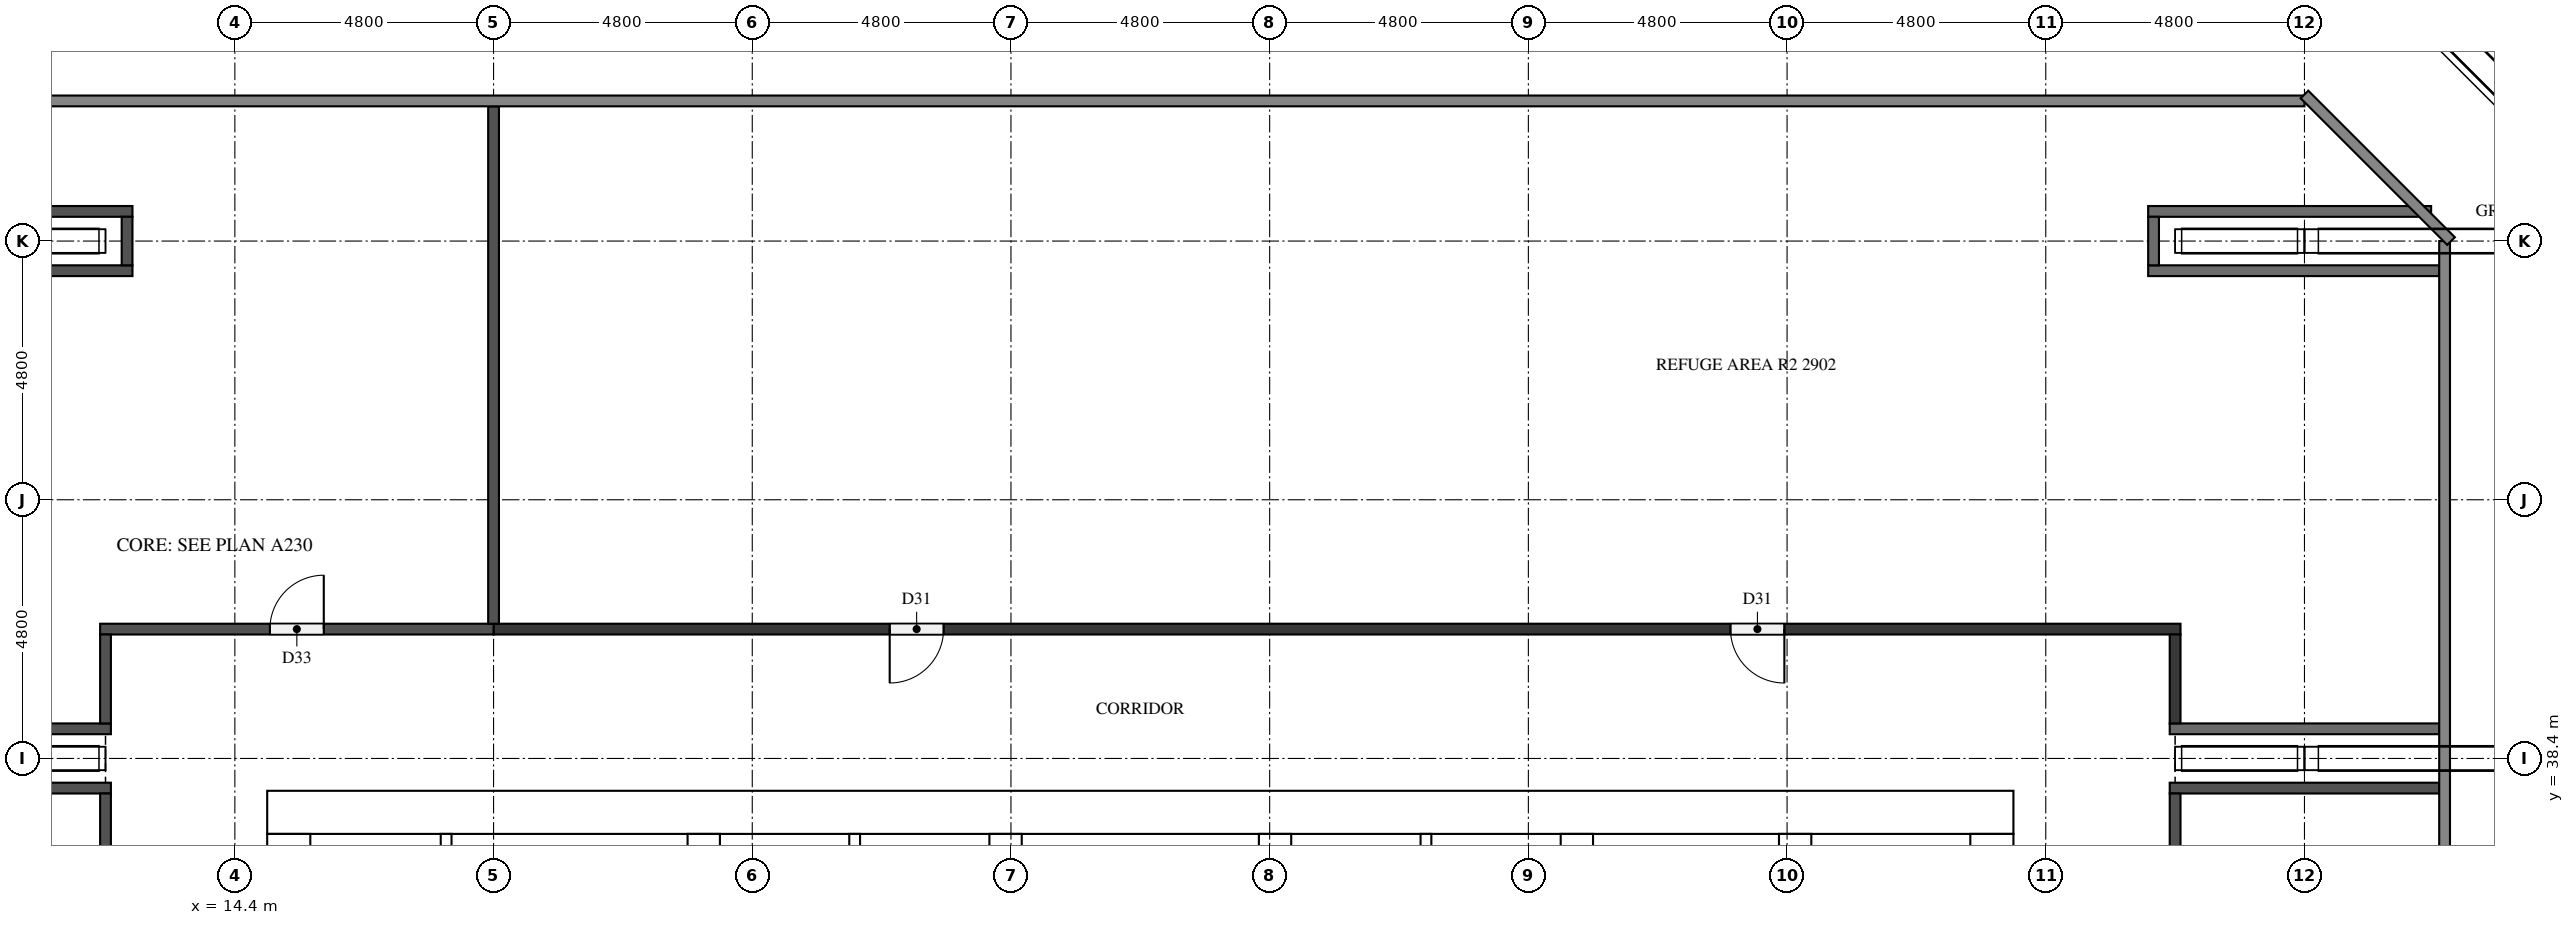
"""IFC4 building model, lengths in metres.
Left out: names, types, materials, properties, quantities, classifications, styles, units other than length and angle.
Written with IfcOpenShell. Run it as: python <this file> out.ifc"""

import sys

from ifc_helpers import new_model, si_unit, direction, frame, frame_2d, origin, place, context, subcontext, project, spatial, rectangle, extrude, element, fill, save


model = new_model("IFC4")
c1 = context("Model", 3, precision=1e-05, world=origin(), true_north=direction((0.0, 1.0)))
c2 = subcontext(c1, "Body", "Model", "MODEL_VIEW")
j1 = project(units=[si_unit("LENGTHUNIT", "METRE"), si_unit("PLANEANGLEUNIT", "RADIAN")], contexts=[c1])
p1 = place(None, origin())
s1 = spatial("IfcSite", under=j1, at=p1, CompositionType="ELEMENT")
p2 = place(p1, origin())
s2 = spatial("IfcBuilding", under=s1, at=p2, CompositionType="ELEMENT")
p3 = place(p2, frame((0.0, 0.0, 113.7)))
s3 = spatial("IfcBuildingStorey", under=s2, at=p3, CompositionType="ELEMENT", Elevation=113.7)
p4 = place(p3, frame((15.0, 37.4, 0.0), z_axis=(0.0, 0.0, 1.0), x_axis=(1.0, 0.0, 0.0)))
e1 = element("IfcWall", 1, at=p4, inside=s3, PredefinedType="SHEAR", context=c2, shape_type="SweptSolid", body=[
    extrude(rectangle(XDim=32.4, YDim=0.8, at=frame_2d((16.2, 0.0))), origin(), (0.0, 0.0, 1.0), 5.1),
])
p5 = place(p4, frame((15.3, 0.0, 0.0)))
e2 = element("IfcOpeningElement", 2, at=p5, cuts=e1, PredefinedType="OPENING", context=c2, shape_type="SweptSolid", body=[
    extrude(rectangle(XDim=1.8, YDim=2.1, at=frame_2d((0.9, 1.05))), frame((0.0, 0.41, 0.0), z_axis=(0.0, -1.0, 0.0), x_axis=(1.0, 0.0, 0.0)), (0.0, 0.0, 1.0), 0.82),
])
p6 = place(p4, frame((1.51, 0.0, 0.0)))
e3 = element("IfcOpeningElement", 3, at=p6, cuts=e1, PredefinedType="OPENING", context=c2, shape_type="SweptSolid", body=[
    extrude(rectangle(XDim=1.0, YDim=2.1, at=frame_2d((0.5, 1.05))), frame((0.0, 0.41, 0.0), z_axis=(0.0, -1.0, 0.0), x_axis=(1.0, 0.0, 0.0)), (0.0, 0.0, 1.0), 0.82),
])
p7 = place(p4, frame((5.11, 0.0, 0.0)))
e4 = element("IfcOpeningElement", 4, at=p7, cuts=e1, PredefinedType="OPENING", context=c2, shape_type="SweptSolid", body=[
    extrude(rectangle(XDim=1.0, YDim=2.1, at=frame_2d((0.5, 1.05))), frame((0.0, 0.41, 0.0), z_axis=(0.0, -1.0, 0.0), x_axis=(1.0, 0.0, 0.0)), (0.0, 0.0, 1.0), 0.82),
])
p8 = place(p3, frame((15.4, 15.8, 0.0), z_axis=(0.0, 0.0, 1.0), x_axis=(0.0, 1.0, 0.0)))
e5 = element("IfcWall", 5, at=p8, inside=s3, PredefinedType="SHEAR", context=c2, shape_type="SweptSolid", body=[
    extrude(rectangle(XDim=21.2, YDim=0.8, at=frame_2d((10.6, 0.0))), origin(), (0.0, 0.0, 1.0), 5.1),
])
p9 = place(p8, frame((4.96, 0.0, 0.0)))
e6 = element("IfcOpeningElement", 6, at=p9, cuts=e5, PredefinedType="OPENING", context=c2, shape_type="SweptSolid", body=[
    extrude(rectangle(XDim=1.2, YDim=2.1, at=frame_2d((0.6, 1.05))), frame((0.0, 0.41, 0.0), z_axis=(0.0, -1.0, 0.0), x_axis=(1.0, 0.0, 0.0)), (0.0, 0.0, 1.0), 0.82),
])
p10 = place(p3, frame((47.0, 15.8, 0.0), z_axis=(0.0, 0.0, 1.0), x_axis=(0.0, 1.0, 0.0)))
e7 = element("IfcWall", 7, at=p10, inside=s3, PredefinedType="SHEAR", context=c2, shape_type="SweptSolid", body=[
    extrude(rectangle(XDim=21.2, YDim=0.8, at=frame_2d((10.6, 0.0))), origin(), (0.0, 0.0, 1.0), 5.1),
])
p11 = place(p10, frame((10.3, 0.0, 0.0)))
e8 = element("IfcOpeningElement", 8, at=p11, cuts=e7, PredefinedType="OPENING", context=c2, shape_type="SweptSolid", body=[
    extrude(rectangle(XDim=1.2, YDim=2.1, at=frame_2d((0.6, 1.05))), frame((0.0, 0.41, 0.0), z_axis=(0.0, -1.0, 0.0), x_axis=(1.0, 0.0, 0.0)), (0.0, 0.0, 1.0), 0.82),
])
p12 = place(p3, frame((23.1, 15.8, 0.0), z_axis=(0.0, 0.0, 1.0), x_axis=(0.0, 1.0, 0.0)))
e9 = element("IfcWall", 9, at=p12, inside=s3, PredefinedType="SHEAR", context=c2, shape_type="SweptSolid", body=[
    extrude(rectangle(XDim=21.2, YDim=0.6, at=frame_2d((10.6, 0.0))), origin(), (0.0, 0.0, 1.0), 5.1),
])
p13 = place(p3, frame((39.3, 27.75, 0.0), z_axis=(0.0, 0.0, 1.0), x_axis=(0.0, 1.0, 0.0)))
e10 = element("IfcWall", 10, at=p13, inside=s3, PredefinedType="SHEAR", context=c2, shape_type="SweptSolid", body=[
    extrude(rectangle(XDim=9.25, YDim=0.6, at=frame_2d((4.625, 0.0))), origin(), (0.0, 0.0, 1.0), 5.1),
])
p14 = place(p3, frame((43.35, 27.75, 0.0), z_axis=(0.0, 0.0, 1.0), x_axis=(0.0, 1.0, 0.0)))
e11 = element("IfcWall", 11, at=p14, inside=s3, PredefinedType="SHEAR", context=c2, shape_type="SweptSolid", body=[
    extrude(rectangle(XDim=9.25, YDim=0.6, at=frame_2d((4.625, 0.0))), origin(), (0.0, 0.0, 1.0), 5.1),
])
p15 = place(p14, frame((7.65, 0.0, 0.0)))
e12 = element("IfcOpeningElement", 12, at=p15, cuts=e11, PredefinedType="OPENING", context=c2, shape_type="SweptSolid", body=[
    extrude(rectangle(XDim=1.2, YDim=2.1, at=frame_2d((0.6, 1.05))), frame((0.0, 0.31, 0.0), z_axis=(0.0, -1.0, 0.0), x_axis=(1.0, 0.0, 0.0)), (0.0, 0.0, 1.0), 0.62),
])
for number, where, z_axis, x_axis in (
    (13, (28.7, 33.85, 0.0), (0.0, 0.0, 1.0), (0.0, 1.0, 0.0)),
    (14, (33.7, 33.85, 0.0), (0.0, 0.0, 1.0), (0.0, 1.0, 0.0)),
):
    element("IfcWall", number, at=place(p3, frame(where, z_axis=z_axis, x_axis=x_axis)), inside=s3, PredefinedType="SHEAR", context=c2, shape_type="SweptSolid", body=[
        extrude(rectangle(XDim=3.15, YDim=0.6, at=frame_2d((1.575, 0.0))), origin(), (0.0, 0.0, 1.0), 5.1),
    ])
for number, where, z_axis, x_axis in (
    (15, (25.9, 33.85, 0.0), (0.0, 0.0, 1.0), (0.0, 1.0, 0.0)),
    (16, (36.5, 33.85, 0.0), (0.0, 0.0, 1.0), (0.0, 1.0, 0.0)),
):
    element("IfcWall", number, at=place(p3, frame(where, z_axis=z_axis, x_axis=x_axis)), inside=s3, PredefinedType="SOLIDWALL", context=c2, shape_type="SweptSolid", body=[
        extrude(rectangle(XDim=3.15, YDim=0.2, at=frame_2d((1.575, 0.0))), origin(), (0.0, 0.0, 1.0), 5.1),
    ])
p16 = place(p3, frame((18.32, 31.55, 0.0), z_axis=(0.0, 0.0, 1.0), x_axis=(0.0, 1.0, 0.0)))
e17 = element("IfcWall", 17, at=p16, inside=s3, PredefinedType="PARTITIONING", context=c2, shape_type="SweptSolid", body=[
    extrude(rectangle(XDim=5.45, YDim=0.2, at=frame_2d((2.725, 0.0))), origin(), (0.0, 0.0, 1.0), 5.1),
])
p17 = place(p3, frame((2.3, 37.85, 0.0), z_axis=(0.0, 0.0, 1.0), x_axis=(1.0, 0.0, 0.0)))
e18 = element("IfcWall", 18, at=p17, inside=s3, PredefinedType="PARTITIONING", context=c2, shape_type="SweptSolid", body=[
    extrude(rectangle(XDim=9.8, YDim=0.2, at=frame_2d((4.9, 0.0))), origin(), (0.0, 0.0, 1.0), 5.1),
])
for number, where, z_axis, x_axis in (
    (19, (50.3, 37.85, 0.0), (0.0, 0.0, 1.0), (1.0, 0.0, 0.0)),
    (20, (50.3, 38.95, 0.0), (0.0, 0.0, 1.0), (1.0, 0.0, 0.0)),
):
    element("IfcWall", number, at=place(p3, frame(where, z_axis=z_axis, x_axis=x_axis)), inside=s3, PredefinedType="PARTITIONING", context=c2, shape_type="SweptSolid", body=[
        extrude(rectangle(XDim=5.0, YDim=0.2, at=frame_2d((2.5, 0.0))), origin(), (0.0, 0.0, 1.0), 5.1),
    ])
p18 = place(p3, frame((2.3, 38.95, 0.0), z_axis=(0.0, 0.0, 1.0), x_axis=(1.0, 0.0, 0.0)))
e21 = element("IfcWall", 21, at=p18, inside=s3, PredefinedType="PARTITIONING", context=c2, shape_type="SweptSolid", body=[
    extrude(rectangle(XDim=9.8, YDim=0.2, at=frame_2d((4.9, 0.0))), origin(), (0.0, 0.0, 1.0), 5.1),
])
p19 = place(p3, frame((50.5, 40.8, 0.0), z_axis=(0.0, 0.0, 1.0), x_axis=(-1.0, 0.0, 0.0)))
e22 = element("IfcWall", 22, at=p19, inside=s3, PredefinedType="PARTITIONING", context=c2, shape_type="SweptSolid", body=[
    extrude(rectangle(XDim=31.3, YDim=0.2, at=frame_2d((15.65, 0.0))), origin(), (0.0, 0.0, 1.0), 5.1),
])
p20 = place(p19, frame((22.95, 0.0, 0.0)))
e23 = element("IfcOpeningElement", 23, at=p20, cuts=e22, PredefinedType="OPENING", context=c2, shape_type="SweptSolid", body=[
    extrude(rectangle(XDim=1.0, YDim=2.1, at=frame_2d((0.5, 1.05))), frame((0.0, 0.11, 0.0), z_axis=(0.0, -1.0, 0.0), x_axis=(1.0, 0.0, 0.0)), (0.0, 0.0, 1.0), 0.22),
])
p21 = place(p19, frame((7.35, 0.0, 0.0)))
e24 = element("IfcOpeningElement", 24, at=p21, cuts=e22, PredefinedType="OPENING", context=c2, shape_type="SweptSolid", body=[
    extrude(rectangle(XDim=1.0, YDim=2.1, at=frame_2d((0.5, 1.05))), frame((0.0, 0.11, 0.0), z_axis=(0.0, -1.0, 0.0), x_axis=(1.0, 0.0, 0.0)), (0.0, 0.0, 1.0), 0.22),
])
p22 = place(p3, frame((11.9, 40.8, 0.0), z_axis=(0.0, 0.0, 1.0), x_axis=(1.0, 0.0, 0.0)))
e25 = element("IfcWall", 25, at=p22, inside=s3, PredefinedType="PARTITIONING", context=c2, shape_type="SweptSolid", body=[
    extrude(rectangle(XDim=7.3, YDim=0.2, at=frame_2d((3.65, 0.0))), origin(), (0.0, 0.0, 1.0), 5.1),
])
p23 = place(p22, frame((3.15, 0.0, 0.0)))
e26 = element("IfcOpeningElement", 26, at=p23, cuts=e25, PredefinedType="OPENING", context=c2, shape_type="SweptSolid", body=[
    extrude(rectangle(XDim=1.0, YDim=2.1, at=frame_2d((0.5, 1.05))), frame((0.0, 0.11, 0.0), z_axis=(0.0, -1.0, 0.0), x_axis=(1.0, 0.0, 0.0)), (0.0, 0.0, 1.0), 0.22),
])
p24 = place(p3, frame((49.9, 47.45, 0.0), z_axis=(0.0, 0.0, 1.0), x_axis=(1.0, 0.0, 0.0)))
e27 = element("IfcWall", 27, at=p24, inside=s3, PredefinedType="PARTITIONING", context=c2, shape_type="SweptSolid", body=[
    extrude(rectangle(XDim=5.4, YDim=0.2, at=frame_2d((2.7, 0.0))), origin(), (0.0, 0.0, 1.0), 5.1),
])
p25 = place(p3, frame((2.3, 47.45, 0.0), z_axis=(0.0, 0.0, 1.0), x_axis=(1.0, 0.0, 0.0)))
e28 = element("IfcWall", 28, at=p25, inside=s3, PredefinedType="PARTITIONING", context=c2, shape_type="SweptSolid", body=[
    extrude(rectangle(XDim=10.2, YDim=0.2, at=frame_2d((5.1, 0.0))), origin(), (0.0, 0.0, 1.0), 5.1),
])
p26 = place(p3, frame((49.9, 48.55, 0.0), z_axis=(0.0, 0.0, 1.0), x_axis=(1.0, 0.0, 0.0)))
e29 = element("IfcWall", 29, at=p26, inside=s3, PredefinedType="PARTITIONING", context=c2, shape_type="SweptSolid", body=[
    extrude(rectangle(XDim=5.25, YDim=0.2, at=frame_2d((2.625, 0.0))), origin(), (0.0, 0.0, 1.0), 5.1),
])
p27 = place(p3, frame((2.45, 48.55, 0.0), z_axis=(0.0, 0.0, 1.0), x_axis=(1.0, 0.0, 0.0)))
e30 = element("IfcWall", 30, at=p27, inside=s3, PredefinedType="PARTITIONING", context=c2, shape_type="SweptSolid", body=[
    extrude(rectangle(XDim=10.05, YDim=0.2, at=frame_2d((5.025, 0.0))), origin(), (0.0, 0.0, 1.0), 5.1),
])
p28 = place(p3, frame((12.0, 29.45, 0.0), z_axis=(0.0, 0.0, 1.0), x_axis=(0.0, 1.0, 0.0)))
e31 = element("IfcWall", 31, at=p28, inside=s3, PredefinedType="PARTITIONING", context=c2, shape_type="SweptSolid", body=[
    extrude(rectangle(XDim=8.3, YDim=0.2, at=frame_2d((4.15, 0.0))), origin(), (0.0, 0.0, 1.0), 5.1),
])
p29 = place(p28, frame((3.65, 0.0, 0.0)))
e32 = element("IfcOpeningElement", 32, at=p29, cuts=e31, PredefinedType="OPENING", context=c2, shape_type="SweptSolid", body=[
    extrude(rectangle(XDim=1.0, YDim=2.1, at=frame_2d((0.5, 1.05))), frame((0.0, 0.11, 0.0), z_axis=(0.0, -1.0, 0.0), x_axis=(1.0, 0.0, 0.0)), (0.0, 0.0, 1.0), 0.22),
])
p30 = place(p3, frame((12.0, 39.05, 0.0), z_axis=(0.0, 0.0, 1.0), x_axis=(0.0, 1.0, 0.0)))
e33 = element("IfcWall", 33, at=p30, inside=s3, PredefinedType="PARTITIONING", context=c2, shape_type="SweptSolid", body=[
    extrude(rectangle(XDim=1.65, YDim=0.2, at=frame_2d((0.825, 0.0))), origin(), (0.0, 0.0, 1.0), 5.1),
])
p31 = place(p3, frame((12.4, 47.55, 0.0), z_axis=(0.0, 0.0, 1.0), x_axis=(0.0, 1.0, 0.0)))
e34 = element("IfcWall", 34, at=p31, inside=s3, PredefinedType="PARTITIONING", context=c2, shape_type="SweptSolid", body=[
    extrude(rectangle(XDim=0.9, YDim=0.2, at=frame_2d((0.45, 0.0))), origin(), (0.0, 0.0, 1.0), 5.1),
])
p32 = place(p3, frame((19.2, 40.9, 0.0), z_axis=(0.0, 0.0, 1.0), x_axis=(0.0, 1.0, 0.0)))
e35 = element("IfcWall", 35, at=p32, inside=s3, PredefinedType="PARTITIONING", context=c2, shape_type="SweptSolid", body=[
    extrude(rectangle(XDim=9.6, YDim=0.2, at=frame_2d((4.8, 0.0))), origin(), (0.0, 0.0, 1.0), 5.1),
])
p33 = place(p3, frame((50.0, 47.55, 0.0), z_axis=(0.0, 0.0, 1.0), x_axis=(0.0, 1.0, 0.0)))
e36 = element("IfcWall", 36, at=p33, inside=s3, PredefinedType="PARTITIONING", context=c2, shape_type="SweptSolid", body=[
    extrude(rectangle(XDim=0.9, YDim=0.2, at=frame_2d((0.45, 0.0))), origin(), (0.0, 0.0, 1.0), 5.1),
])
p34 = place(p3, frame((50.4, 39.05, 0.0), z_axis=(0.0, 0.0, 1.0), x_axis=(0.0, 1.0, 0.0)))
e37 = element("IfcWall", 37, at=p34, inside=s3, PredefinedType="PARTITIONING", context=c2, shape_type="SweptSolid", body=[
    extrude(rectangle(XDim=1.65, YDim=0.2, at=frame_2d((0.825, 0.0))), origin(), (0.0, 0.0, 1.0), 5.1),
])
p35 = place(p3, frame((50.4, 37.75, 0.0), z_axis=(0.0, 0.0, 1.0), x_axis=(0.0, -1.0, 0.0)))
e38 = element("IfcWall", 38, at=p35, inside=s3, PredefinedType="PARTITIONING", context=c2, shape_type="SweptSolid", body=[
    extrude(rectangle(XDim=8.3, YDim=0.2, at=frame_2d((4.15, 0.0))), origin(), (0.0, 0.0, 1.0), 5.1),
])
p36 = place(p35, frame((3.65, 0.0, 0.0)))
e39 = element("IfcOpeningElement", 39, at=p36, cuts=e38, PredefinedType="OPENING", context=c2, shape_type="SweptSolid", body=[
    extrude(rectangle(XDim=1.0, YDim=2.1, at=frame_2d((0.5, 1.05))), frame((0.0, 0.11, 0.0), z_axis=(0.0, -1.0, 0.0), x_axis=(1.0, 0.0, 0.0)), (0.0, 0.0, 1.0), 0.22),
])
p37 = place(p5, origin())
e40 = element("IfcDoor", 40, at=p37, inside=s3, OperationType="DOUBLE_DOOR_SINGLE_SWING", PredefinedType="DOOR", context=c2, shape_type="SweptSolid", body=[
    extrude(rectangle(XDim=1.8, YDim=2.1, at=frame_2d((0.9, 1.05))), frame((0.0, 0.025, 0.0), z_axis=(0.0, -1.0, 0.0), x_axis=(1.0, 0.0, 0.0)), (0.0, 0.0, 1.0), 0.05),
])
fill(e2, e40)
p38 = place(p6, origin())
e41 = element("IfcDoor", 41, at=p38, inside=s3, OperationType="SINGLE_SWING_RIGHT", PredefinedType="DOOR", context=c2, shape_type="SweptSolid", body=[
    extrude(rectangle(XDim=1.0, YDim=2.1, at=frame_2d((0.5, 1.05))), frame((0.0, 0.025, 0.0), z_axis=(0.0, -1.0, 0.0), x_axis=(1.0, 0.0, 0.0)), (0.0, 0.0, 1.0), 0.05),
])
fill(e3, e41)
p39 = place(p7, origin())
e42 = element("IfcDoor", 42, at=p39, inside=s3, OperationType="SINGLE_SWING_LEFT", PredefinedType="DOOR", context=c2, shape_type="SweptSolid", body=[
    extrude(rectangle(XDim=1.0, YDim=2.1, at=frame_2d((0.5, 1.05))), frame((0.0, 0.025, 0.0), z_axis=(0.0, -1.0, 0.0), x_axis=(1.0, 0.0, 0.0)), (0.0, 0.0, 1.0), 0.05),
])
fill(e4, e42)
p40 = place(p23, origin())
e43 = element("IfcDoor", 43, at=p40, inside=s3, OperationType="SINGLE_SWING_RIGHT", PredefinedType="DOOR", context=c2, shape_type="SweptSolid", body=[
    extrude(rectangle(XDim=1.0, YDim=2.1, at=frame_2d((0.5, 1.05))), frame((0.0, 0.025, 0.0), z_axis=(0.0, -1.0, 0.0), x_axis=(1.0, 0.0, 0.0)), (0.0, 0.0, 1.0), 0.05),
])
fill(e26, e43)
p41 = place(p20, origin())
e44 = element("IfcDoor", 44, at=p41, inside=s3, OperationType="SINGLE_SWING_RIGHT", PredefinedType="DOOR", context=c2, shape_type="SweptSolid", body=[
    extrude(rectangle(XDim=1.0, YDim=2.1, at=frame_2d((0.5, 1.05))), frame((0.0, 0.025, 0.0), z_axis=(0.0, -1.0, 0.0), x_axis=(1.0, 0.0, 0.0)), (0.0, 0.0, 1.0), 0.05),
])
fill(e23, e44)
p42 = place(p21, origin())
e45 = element("IfcDoor", 45, at=p42, inside=s3, OperationType="SINGLE_SWING_LEFT", PredefinedType="DOOR", context=c2, shape_type="SweptSolid", body=[
    extrude(rectangle(XDim=1.0, YDim=2.1, at=frame_2d((0.5, 1.05))), frame((0.0, 0.025, 0.0), z_axis=(0.0, -1.0, 0.0), x_axis=(1.0, 0.0, 0.0)), (0.0, 0.0, 1.0), 0.05),
])
fill(e24, e45)
save(model, sys.argv[1])
